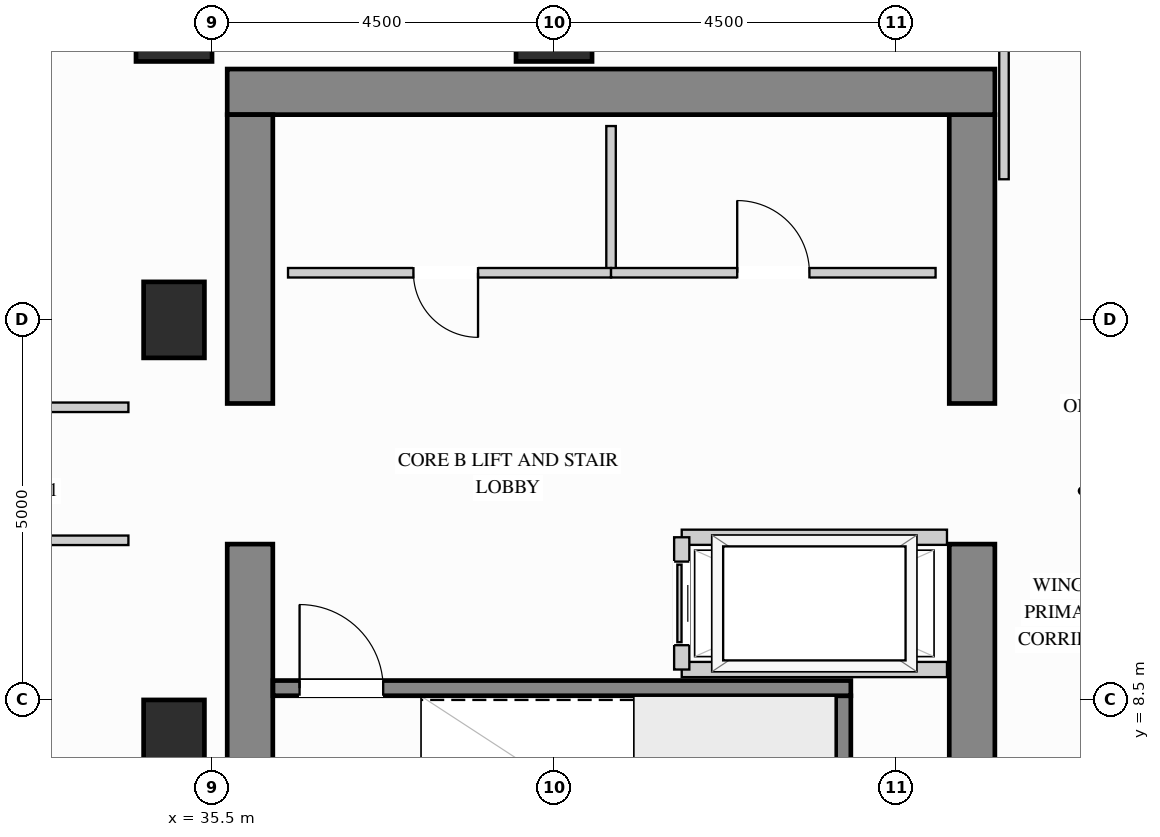
"""IFC4 building model, lengths in metres.
Left out: names, types, materials, properties, quantities, classifications, styles, units other than length and angle.
Written with IfcOpenShell. Run it as: python <this file> out.ifc"""

import sys

from ifc_helpers import new_model, si_unit, direction, frame, frame_2d, origin, origin_2d, place, context, subcontext, project, spatial, rectangle, extrude, source, transform, mapped, element, fill, save


model = new_model("IFC4")
c1 = context("Model", 3, precision=1e-05, world=origin(), true_north=direction((0.0, 1.0)))
c2 = subcontext(c1, "Body", "Model", "MODEL_VIEW")
j1 = project(units=[si_unit("LENGTHUNIT", "METRE"), si_unit("PLANEANGLEUNIT", "RADIAN")], contexts=[c1])
p1 = place(None, origin())
s1 = spatial("IfcSite", under=j1, at=p1, CompositionType="ELEMENT")
p2 = place(p1, origin())
s2 = spatial("IfcBuilding", under=s1, at=p2, CompositionType="ELEMENT")
p3 = place(p2, frame((0.0, 0.0, 150.3)))
s3 = spatial("IfcBuildingStorey", under=s2, at=p3, CompositionType="ELEMENT", Elevation=150.3)
m1 = source(origin(), c2, "Body", "SweptSolid", [
    extrude(rectangle(XDim=0.8, YDim=1.0, at=origin_2d()), origin(), (0.0, 0.0, 1.0), 3.4),
])
for number, where, z_axis, x_axis in (
    (1, (35.0, 13.5, 0.0), (0.0, 0.0, 1.0), (1.0, 0.0, 0.0)),
    (2, (35.0, 8.0, 0.0), (0.0, 0.0, 1.0), (1.0, 0.0, 0.0)),
):
    element("IfcColumn", number, at=place(p3, frame(where, z_axis=z_axis, x_axis=x_axis)), inside=s3, PredefinedType="COLUMN", context=c2, shape_type="MappedRepresentation", body=[
        mapped(m1, transform((0.0, 0.0, 0.0), x_axis=(1.0, 0.0, 0.0), y_axis=(0.0, 1.0, 0.0), z_axis=(0.0, 0.0, 1.0))),
    ])
m2 = source(origin(), c2, "Body", "SweptSolid", [
    extrude(rectangle(XDim=1.0, YDim=1.0, at=origin_2d()), origin(), (0.0, 0.0, 1.0), 3.4),
])
for number, where, z_axis, x_axis in (
    (3, (35.0, 17.4, 0.0), (0.0, 0.0, 1.0), (1.0, 0.0, 0.0)),
    (4, (40.0, 17.4, 0.0), (0.0, 0.0, 1.0), (1.0, 0.0, 0.0)),
):
    element("IfcColumn", number, at=place(p3, frame(where, z_axis=z_axis, x_axis=x_axis)), inside=s3, PredefinedType="COLUMN", context=c2, shape_type="MappedRepresentation", body=[
        mapped(m2, transform((0.0, 0.0, 0.0), x_axis=(1.0, 0.0, 0.0), y_axis=(0.0, 1.0, 0.0), z_axis=(0.0, 0.0, 1.0))),
    ])
m3 = source(origin(), c2, "Body", "SweptSolid", [
    extrude(rectangle(XDim=5.75, YDim=0.6, at=frame_2d((2.875, 0.0))), origin(), (0.0, 0.0, 1.0), 3.4),
])
p4 = place(p3, frame((45.5, 4.8, 0.0), z_axis=(0.0, 0.0, 1.0), x_axis=(0.0, 1.0, 0.0)))
e5 = element("IfcWall", 5, at=p4, inside=s3, PredefinedType="SHEAR", context=c2, shape_type="MappedRepresentation", body=[
    mapped(m3, transform((0.0, 0.0, 0.0), x_axis=(1.0, 0.0, 0.0), y_axis=(0.0, 1.0, 0.0), z_axis=(0.0, 0.0, 1.0))),
])
m4 = source(origin(), c2, "Body", "SweptSolid", [
    extrude(rectangle(XDim=3.8, YDim=0.6, at=frame_2d((1.9, 0.0))), origin(), (0.0, 0.0, 1.0), 3.4),
])
p5 = place(p3, frame((45.5, 12.4, 0.0), z_axis=(0.0, 0.0, 1.0), x_axis=(0.0, 1.0, 0.0)))
e6 = element("IfcWall", 6, at=p5, inside=s3, PredefinedType="SHEAR", context=c2, shape_type="MappedRepresentation", body=[
    mapped(m4, transform((0.0, 0.0, 0.0), x_axis=(1.0, 0.0, 0.0), y_axis=(0.0, 1.0, 0.0), z_axis=(0.0, 0.0, 1.0))),
])
m5 = source(origin(), c2, "Body", "SweptSolid", [
    extrude(rectangle(XDim=10.1, YDim=0.6, at=frame_2d((5.05, 0.0))), origin(), (0.0, 0.0, 1.0), 3.4),
])
p6 = place(p3, frame((35.7, 16.5, 0.0), z_axis=(0.0, 0.0, 1.0), x_axis=(1.0, 0.0, 0.0)))
e7 = element("IfcWall", 7, at=p6, inside=s3, PredefinedType="SHEAR", context=c2, shape_type="MappedRepresentation", body=[
    mapped(m5, transform((0.0, 0.0, 0.0), x_axis=(1.0, 0.0, 0.0), y_axis=(0.0, 1.0, 0.0), z_axis=(0.0, 0.0, 1.0))),
])
p7 = place(p3, frame((36.0, 4.8, 0.0), z_axis=(0.0, 0.0, 1.0), x_axis=(0.0, 1.0, 0.0)))
e8 = element("IfcWall", 8, at=p7, inside=s3, PredefinedType="SHEAR", context=c2, shape_type="MappedRepresentation", body=[
    mapped(m3, transform((0.0, 0.0, 0.0), x_axis=(1.0, 0.0, 0.0), y_axis=(0.0, 1.0, 0.0), z_axis=(0.0, 0.0, 1.0))),
])
p8 = place(p3, frame((36.0, 12.4, 0.0), z_axis=(0.0, 0.0, 1.0), x_axis=(0.0, 1.0, 0.0)))
e9 = element("IfcWall", 9, at=p8, inside=s3, PredefinedType="SHEAR", context=c2, shape_type="MappedRepresentation", body=[
    mapped(m4, transform((0.0, 0.0, 0.0), x_axis=(1.0, 0.0, 0.0), y_axis=(0.0, 1.0, 0.0), z_axis=(0.0, 0.0, 1.0))),
])
m6 = source(origin(), c2, "Body", "SweptSolid", [
    extrude(rectangle(XDim=1.93, YDim=0.125, at=frame_2d((0.965, 0.0))), origin(), (0.0, 0.0, 1.0), 3.385),
])
p9 = place(p3, frame((40.75, 14.12, 0.0), z_axis=(0.0, 0.0, 1.0), x_axis=(0.0, 1.0, 0.0)))
e10 = element("IfcWall", 10, at=p9, inside=s3, PredefinedType="PARTITIONING", context=c2, shape_type="MappedRepresentation", body=[
    mapped(m6, transform((0.0, 0.0, 0.0), x_axis=(1.0, 0.0, 0.0), y_axis=(0.0, 1.0, 0.0), z_axis=(0.0, 0.0, 1.0))),
])
p10 = place(p3, frame((36.5, 14.12, 0.0), z_axis=(0.0, 0.0, 1.0), x_axis=(1.0, 0.0, 0.0)))
e11 = element("IfcWall", 11, at=p10, inside=s3, PredefinedType="PARTITIONING", context=c2, shape_type="SweptSolid", body=[
    extrude(rectangle(XDim=4.25, YDim=0.125, at=frame_2d((2.125, 0.0))), origin(), (0.0, 0.0, 1.0), 3.385),
])
p11 = place(p10, frame((1.65, 0.0, 0.0)))
e12 = element("IfcOpeningElement", 12, at=p11, cuts=e11, PredefinedType="OPENING", context=c2, shape_type="SweptSolid", body=[
    extrude(rectangle(XDim=0.85, YDim=2.1, at=frame_2d((0.425, 1.05))), frame((0.0, 0.073, 0.0), z_axis=(0.0, -1.0, 0.0), x_axis=(1.0, 0.0, 0.0)), (0.0, 0.0, 1.0), 0.145),
])
p12 = place(p3, frame((40.75, 14.12, 0.0), z_axis=(0.0, 0.0, 1.0), x_axis=(1.0, 0.0, 0.0)))
e13 = element("IfcWall", 13, at=p12, inside=s3, PredefinedType="PARTITIONING", context=c2, shape_type="SweptSolid", body=[
    extrude(rectangle(XDim=4.27, YDim=0.125, at=frame_2d((2.135, 0.0))), origin(), (0.0, 0.0, 1.0), 3.385),
])
p13 = place(p12, frame((1.66, 0.0, 0.0)))
e14 = element("IfcOpeningElement", 14, at=p13, cuts=e13, PredefinedType="OPENING", context=c2, shape_type="SweptSolid", body=[
    extrude(rectangle(XDim=0.95, YDim=2.15, at=frame_2d((0.475, 1.075))), frame((0.0, 0.073, 0.0), z_axis=(0.0, -1.0, 0.0), x_axis=(1.0, 0.0, 0.0)), (0.0, 0.0, 1.0), 0.145),
])
m7 = source(origin(), c2, "Body", "SweptSolid", [
    extrude(rectangle(XDim=2.298, YDim=0.125, at=frame_2d((1.149, 0.0))), origin(), (0.0, 0.0, 1.0), 3.385),
])
p14 = place(p3, frame((45.92, 15.35, 0.0), z_axis=(0.0, 0.0, 1.0), x_axis=(0.0, 1.0, 0.0)))
e15 = element("IfcWall", 15, at=p14, inside=s3, PredefinedType="PARTITIONING", context=c2, shape_type="MappedRepresentation", body=[
    mapped(m7, transform((0.0, 0.0, 0.0), x_axis=(1.0, 0.0, 0.0), y_axis=(0.0, 1.0, 0.0), z_axis=(0.0, 0.0, 1.0))),
])
p15 = place(p3, frame((29.85, 12.35, 0.0), z_axis=(0.0, 0.0, 1.0), x_axis=(1.0, 0.0, 0.0)))
e16 = element("IfcWall", 16, at=p15, inside=s3, PredefinedType="PARTITIONING", context=c2, shape_type="SweptSolid", body=[
    extrude(rectangle(XDim=4.55, YDim=0.125, at=frame_2d((2.275, 0.0))), origin(), (0.0, 0.0, 1.0), 3.385),
])
p16 = place(p15, frame((1.8, 0.0, 0.0)))
e17 = element("IfcOpeningElement", 17, at=p16, cuts=e16, PredefinedType="OPENING", context=c2, shape_type="SweptSolid", body=[
    extrude(rectangle(XDim=0.95, YDim=2.15, at=frame_2d((0.475, 1.075))), frame((0.0, 0.073, 0.0), z_axis=(0.0, -1.0, 0.0), x_axis=(1.0, 0.0, 0.0)), (0.0, 0.0, 1.0), 0.145),
])
p17 = place(p3, frame((29.85, 10.6, 0.0), z_axis=(0.0, 0.0, 1.0), x_axis=(1.0, 0.0, 0.0)))
e18 = element("IfcWall", 18, at=p17, inside=s3, PredefinedType="PARTITIONING", context=c2, shape_type="SweptSolid", body=[
    extrude(rectangle(XDim=4.55, YDim=0.125, at=frame_2d((2.275, 0.0))), origin(), (0.0, 0.0, 1.0), 3.385),
])
p18 = place(p17, frame((1.8, 0.0, 0.0)))
e19 = element("IfcOpeningElement", 19, at=p18, cuts=e18, PredefinedType="OPENING", context=c2, shape_type="SweptSolid", body=[
    extrude(rectangle(XDim=0.95, YDim=2.15, at=frame_2d((0.475, 1.075))), frame((0.0, 0.073, 0.0), z_axis=(0.0, -1.0, 0.0), x_axis=(1.0, 0.0, 0.0)), (0.0, 0.0, 1.0), 0.145),
])
m8 = source(origin(), c2, "Body", "SweptSolid", [
    extrude(rectangle(XDim=3.49, YDim=0.2, at=frame_2d((1.745, 0.0))), origin(), (0.0, 0.0, 1.0), 3.385),
])
for number, where, z_axis, x_axis in (
    (20, (41.68, 10.64, 0.0), (0.0, 0.0, 1.0), (1.0, 0.0, 0.0)),
    (21, (41.68, 8.9, 0.0), (0.0, 0.0, 1.0), (1.0, 0.0, 0.0)),
):
    element("IfcWall", number, at=place(p3, frame(where, z_axis=z_axis, x_axis=x_axis)), inside=s3, PredefinedType="PARTITIONING", context=c2, shape_type="MappedRepresentation", body=[
        mapped(m8, transform((0.0, 0.0, 0.0), x_axis=(1.0, 0.0, 0.0), y_axis=(0.0, 1.0, 0.0), z_axis=(0.0, 0.0, 1.0))),
    ])
p19 = place(p3, frame((41.68, 8.9, 0.0), z_axis=(0.0, 0.0, 1.0), x_axis=(0.0, 1.0, 0.0)))
e22 = element("IfcWall", 22, at=p19, inside=s3, PredefinedType="PARTITIONING", context=c2, shape_type="SweptSolid", body=[
    extrude(rectangle(XDim=1.74, YDim=0.2, at=frame_2d((0.87, 0.0))), origin(), (0.0, 0.0, 1.0), 3.385),
])
p20 = place(p19, frame((0.32, 0.0, 0.0)))
e23 = element("IfcOpeningElement", 23, at=p20, cuts=e22, PredefinedType="OPENING", context=c2, shape_type="SweptSolid", body=[
    extrude(rectangle(XDim=1.1, YDim=2.2, at=frame_2d((0.55, 1.1))), frame((0.0, 0.11, 0.0), z_axis=(0.0, -1.0, 0.0), x_axis=(1.0, 0.0, 0.0)), (0.0, 0.0, 1.0), 0.22),
])
m9 = source(origin(), c2, "Body", "SweptSolid", [
    extrude(rectangle(XDim=3.753, YDim=0.2, at=frame_2d((1.876, 0.0))), origin(), (0.0, 0.0, 1.0), 3.4),
])
p21 = place(p3, frame((43.805, 4.802, 0.0), z_axis=(0.0, 0.0, 1.0), x_axis=(0.0, 1.0, 0.0)))
e24 = element("IfcWall", 24, at=p21, inside=s3, PredefinedType="SHEAR", context=c2, shape_type="MappedRepresentation", body=[
    mapped(m9, transform((0.0, 0.0, 0.0), x_axis=(1.0, 0.0, 0.0), y_axis=(0.0, 1.0, 0.0), z_axis=(0.0, 0.0, 1.0))),
])
p22 = place(p3, frame((36.302, 8.655, 0.0), z_axis=(0.0, 0.0, 1.0), x_axis=(1.0, 0.0, 0.0)))
e25 = element("IfcWall", 25, at=p22, inside=s3, PredefinedType="SHEAR", context=c2, shape_type="SweptSolid", body=[
    extrude(rectangle(XDim=7.603, YDim=0.2, at=frame_2d((3.802, 0.0))), origin(), (0.0, 0.0, 1.0), 3.4),
])
p23 = place(p22, frame((0.35, 0.0, 0.0)))
e26 = element("IfcOpeningElement", 26, at=p23, cuts=e25, PredefinedType="OPENING", context=c2, shape_type="SweptSolid", body=[
    extrude(rectangle(XDim=1.1, YDim=2.15, at=frame_2d((0.55, 1.075))), frame((0.0, 0.11, 0.0), z_axis=(0.0, -1.0, 0.0), x_axis=(1.0, 0.0, 0.0)), (0.0, 0.0, 1.0), 0.22),
])
m10 = source(origin(), c2, "Body", "SweptSolid", [
    extrude(rectangle(XDim=1.1, YDim=2.2, at=frame_2d((0.55, 1.1))), frame((0.0, 0.025, 0.0), z_axis=(0.0, -1.0, 0.0), x_axis=(1.0, 0.0, 0.0)), (0.0, 0.0, 1.0), 0.05),
])
p24 = place(p20, origin())
e27 = element("IfcDoor", 27, at=p24, inside=s3, OperationType="SLIDING_TO_LEFT", PredefinedType="DOOR", context=c2, shape_type="MappedRepresentation", body=[
    mapped(m10, transform((0.0, 0.0, 0.0), x_axis=(1.0, 0.0, 0.0), y_axis=(0.0, 1.0, 0.0), z_axis=(0.0, 0.0, 1.0))),
])
fill(e23, e27)
m11 = source(origin(), c2, "Body", "SweptSolid", [
    extrude(rectangle(XDim=0.95, YDim=2.15, at=frame_2d((0.475, 1.075))), frame((0.0, 0.025, 0.0), z_axis=(0.0, -1.0, 0.0), x_axis=(1.0, 0.0, 0.0)), (0.0, 0.0, 1.0), 0.05),
])
p25 = place(p13, origin())
e28 = element("IfcDoor", 28, at=p25, inside=s3, OperationType="SINGLE_SWING_LEFT", PredefinedType="DOOR", context=c2, shape_type="MappedRepresentation", body=[
    mapped(m11, transform((0.0, 0.0, 0.0), x_axis=(1.0, 0.0, 0.0), y_axis=(0.0, 1.0, 0.0), z_axis=(0.0, 0.0, 1.0))),
])
fill(e14, e28)
m12 = source(origin(), c2, "Body", "SweptSolid", [
    extrude(rectangle(XDim=0.85, YDim=2.1, at=frame_2d((0.425, 1.05))), frame((0.0, 0.025, 0.0), z_axis=(0.0, -1.0, 0.0), x_axis=(1.0, 0.0, 0.0)), (0.0, 0.0, 1.0), 0.05),
])
p26 = place(p11, origin())
e29 = element("IfcDoor", 29, at=p26, inside=s3, OperationType="SINGLE_SWING_RIGHT", PredefinedType="DOOR", context=c2, shape_type="MappedRepresentation", body=[
    mapped(m12, transform((0.0, 0.0, 0.0), x_axis=(1.0, 0.0, 0.0), y_axis=(0.0, 1.0, 0.0), z_axis=(0.0, 0.0, 1.0))),
])
fill(e12, e29)
m13 = source(origin(), c2, "Body", "SweptSolid", [
    extrude(rectangle(XDim=1.1, YDim=2.15, at=frame_2d((0.55, 1.075))), frame((0.0, 0.025, 0.0), z_axis=(0.0, -1.0, 0.0), x_axis=(1.0, 0.0, 0.0)), (0.0, 0.0, 1.0), 0.05),
])
p27 = place(p23, origin())
e30 = element("IfcDoor", 30, at=p27, inside=s3, OperationType="SINGLE_SWING_LEFT", PredefinedType="DOOR", context=c2, shape_type="MappedRepresentation", body=[
    mapped(m13, transform((0.0, 0.0, 0.0), x_axis=(1.0, 0.0, 0.0), y_axis=(0.0, 1.0, 0.0), z_axis=(0.0, 0.0, 1.0))),
])
fill(e26, e30)
save(model, sys.argv[1])
